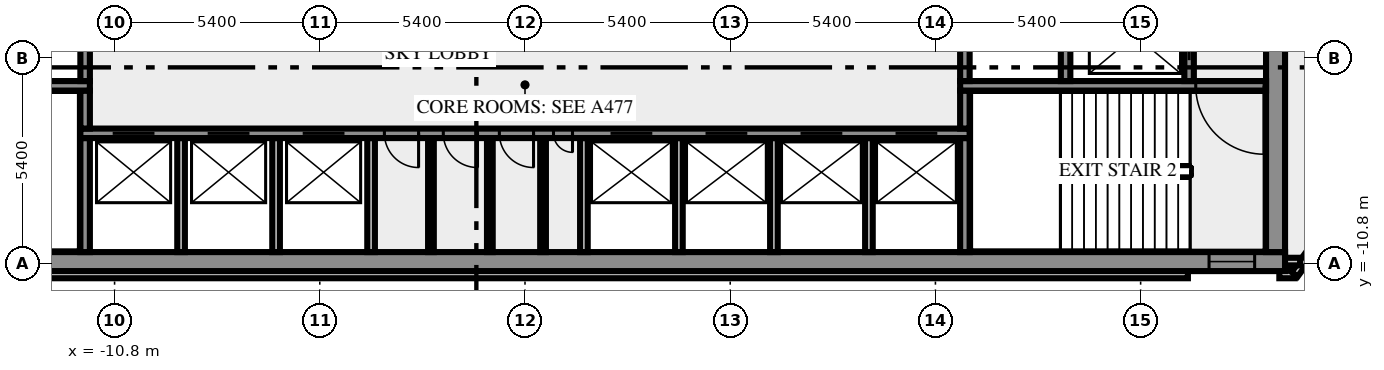
"""IFC4 building model, lengths in metres.
Left out: names, types, materials, properties, quantities, classifications, styles, units other than length and angle.
Written with IfcOpenShell. Run it as: python <this file> out.ifc"""

import sys

from ifc_helpers import new_model, si_unit, direction, frame, frame_2d, origin, place, context, subcontext, project, spatial, rectangle, extrude, element, fill, save


model = new_model("IFC4")
c1 = context("Model", 3, precision=1e-05, world=origin(), true_north=direction((0.0, 1.0)))
c2 = subcontext(c1, "Body", "Model", "MODEL_VIEW")
j1 = project(units=[si_unit("LENGTHUNIT", "METRE"), si_unit("PLANEANGLEUNIT", "RADIAN")], contexts=[c1])
p1 = place(None, origin())
s1 = spatial("IfcSite", under=j1, at=p1, CompositionType="ELEMENT")
p2 = place(p1, origin())
s2 = spatial("IfcBuilding", under=s1, at=p2, CompositionType="ELEMENT")
p3 = place(p2, frame((0.0, 0.0, 139.0)))
s3 = spatial("IfcBuildingStorey", under=s2, at=p3, CompositionType="ELEMENT", Elevation=139.0)
p4 = place(p3, frame((-17.444, -11.088, 0.0), z_axis=(0.0, 0.0, 1.0), x_axis=(1.0, 0.0, 0.0)))
e1 = element("IfcWall", 1, at=p4, inside=s3, PredefinedType="SOLIDWALL", context=c2, shape_type="SweptSolid", body=[
    extrude(rectangle(XDim=34.888, YDim=0.2, at=frame_2d((17.444, 0.0))), origin(), (0.0, 0.0, 1.0), 4.65),
])
p5 = place(p3, frame((19.85, -11.088, 0.0), z_axis=(0.0, 0.0, 1.0), x_axis=(1.0, 0.0, 0.0)))
e2 = element("IfcWall", 2, at=p5, inside=s3, PredefinedType="SOLIDWALL", context=c2, shape_type="SweptSolid", body=[
    extrude(rectangle(XDim=0.406, YDim=0.2, at=frame_2d((0.203, 0.0))), origin(), (0.0, 0.0, 1.0), 4.65),
])
p6 = place(p3, frame((20.253, -11.083, 0.0), z_axis=(0.0, 0.0, 1.0), x_axis=(0.587766567315, 0.809030569476, 0.0)))
e3 = element("IfcWall", 3, at=p6, inside=s3, PredefinedType="SOLIDWALL", context=c2, shape_type="SweptSolid", body=[
    extrude(rectangle(XDim=2.688, YDim=0.2, at=frame_2d((1.344, 0.0))), origin(), (0.0, 0.0, 1.0), 4.65),
])
p7 = place(p3, frame((19.98, -10.75, 0.0), z_axis=(0.0, 0.0, 1.0), x_axis=(1.0, 0.0, 0.0)))
e4 = element("IfcWall", 4, at=p7, inside=s3, PredefinedType="SOLIDWALL", context=c2, shape_type="SweptSolid", body=[
    extrude(rectangle(XDim=0.417, YDim=0.2, at=frame_2d((0.208, 0.0))), origin(), (0.0, 0.0, 1.0), 4.65),
])
p8 = place(p3, frame((-20.0, -10.75, 0.0), z_axis=(0.0, 0.0, 1.0), x_axis=(1.0, 0.0, 0.0)))
e5 = element("IfcWall", 5, at=p8, inside=s3, PredefinedType="SHEAR", context=c2, shape_type="SweptSolid", body=[
    extrude(rectangle(XDim=40.0, YDim=0.5, at=frame_2d((20.0, 0.0))), origin(), (0.0, 0.0, 1.0), 4.65),
])
p9 = place(p8, frame((0.8, 0.0, 1.0)))
e6 = element("IfcOpeningElement", 6, at=p9, cuts=e5, PredefinedType="OPENING", context=c2, shape_type="SweptSolid", body=[
    extrude(rectangle(XDim=1.2, YDim=1.2, at=frame_2d((0.6, 0.6))), frame((0.0, 0.26, 0.0), z_axis=(0.0, -1.0, 0.0), x_axis=(1.0, 0.0, 0.0)), (0.0, 0.0, 1.0), 0.52),
])
p10 = place(p8, frame((38.0, 0.0, 1.0)))
e7 = element("IfcOpeningElement", 7, at=p10, cuts=e5, PredefinedType="OPENING", context=c2, shape_type="SweptSolid", body=[
    extrude(rectangle(XDim=1.2, YDim=1.2, at=frame_2d((0.6, 0.6))), frame((0.0, 0.26, 0.0), z_axis=(0.0, -1.0, 0.0), x_axis=(1.0, 0.0, 0.0)), (0.0, 0.0, 1.0), 0.52),
])
p11 = place(p3, frame((-11.575, -10.5, 0.0), z_axis=(0.0, 0.0, 1.0), x_axis=(0.0, 1.0, 0.0)))
e8 = element("IfcWall", 8, at=p11, inside=s3, PredefinedType="SHEAR", context=c2, shape_type="SweptSolid", body=[
    extrude(rectangle(XDim=3.0, YDim=0.25, at=frame_2d((1.5, 0.0))), origin(), (0.0, 0.0, 1.0), 4.65),
])
for number, where, z_axis, x_axis in (
    (9, (-9.05, -10.5, 0.0), (0.0, 0.0, 1.0), (0.0, 1.0, 0.0)),
    (10, (-6.55, -10.5, 0.0), (0.0, 0.0, 1.0), (0.0, 1.0, 0.0)),
    (11, (-4.05, -10.5, 0.0), (0.0, 0.0, 1.0), (0.0, 1.0, 0.0)),
):
    element("IfcWall", number, at=place(p3, frame(where, z_axis=z_axis, x_axis=x_axis)), inside=s3, PredefinedType="SOLIDWALL", context=c2, shape_type="SweptSolid", body=[
        extrude(rectangle(XDim=3.0, YDim=0.2, at=frame_2d((1.5, 0.0))), origin(), (0.0, 0.0, 1.0), 4.65),
    ])
for number, where, z_axis, x_axis in (
    (12, (-2.475, -10.5, 0.0), (0.0, 0.0, 1.0), (0.0, 1.0, 0.0)),
    (13, (-0.925, -10.5, 0.0), (0.0, 0.0, 1.0), (0.0, 1.0, 0.0)),
    (14, (0.475, -10.5, 0.0), (0.0, 0.0, 1.0), (0.0, 1.0, 0.0)),
):
    element("IfcWall", number, at=place(p3, frame(where, z_axis=z_axis, x_axis=x_axis)), inside=s3, PredefinedType="PARTITIONING", context=c2, shape_type="SweptSolid", body=[
        extrude(rectangle(XDim=3.0, YDim=0.15, at=frame_2d((1.5, 0.0))), origin(), (0.0, 0.0, 1.0), 4.65),
    ])
for number, where, z_axis, x_axis in (
    (15, (1.55, -10.5, 0.0), (0.0, 0.0, 1.0), (0.0, 1.0, 0.0)),
    (16, (4.05, -10.5, 0.0), (0.0, 0.0, 1.0), (0.0, 1.0, 0.0)),
    (17, (6.55, -10.5, 0.0), (0.0, 0.0, 1.0), (0.0, 1.0, 0.0)),
    (18, (9.05, -10.5, 0.0), (0.0, 0.0, 1.0), (0.0, 1.0, 0.0)),
):
    element("IfcWall", number, at=place(p3, frame(where, z_axis=z_axis, x_axis=x_axis)), inside=s3, PredefinedType="SOLIDWALL", context=c2, shape_type="SweptSolid", body=[
        extrude(rectangle(XDim=3.0, YDim=0.2, at=frame_2d((1.5, 0.0))), origin(), (0.0, 0.0, 1.0), 4.65),
    ])
p12 = place(p3, frame((11.575, -10.5, 0.0), z_axis=(0.0, 0.0, 1.0), x_axis=(0.0, 1.0, 0.0)))
e19 = element("IfcWall", 19, at=p12, inside=s3, PredefinedType="SHEAR", context=c2, shape_type="SweptSolid", body=[
    extrude(rectangle(XDim=3.0, YDim=0.25, at=frame_2d((1.5, 0.0))), origin(), (0.0, 0.0, 1.0), 4.65),
])
p13 = place(p3, frame((19.75, -10.5, 0.0), z_axis=(0.0, 0.0, 1.0), x_axis=(0.0, 1.0, 0.0)))
e20 = element("IfcWall", 20, at=p13, inside=s3, PredefinedType="SHEAR", context=c2, shape_type="SweptSolid", body=[
    extrude(rectangle(XDim=8.8, YDim=0.5, at=frame_2d((4.4, 0.0))), origin(), (0.0, 0.0, 1.0), 4.65),
])
p14 = place(p3, frame((11.7, -7.375, 0.0), z_axis=(0.0, 0.0, 1.0), x_axis=(-1.0, 0.0, 0.0)))
e21 = element("IfcWall", 21, at=p14, inside=s3, PredefinedType="SHEAR", context=c2, shape_type="SweptSolid", body=[
    extrude(rectangle(XDim=23.4, YDim=0.25, at=frame_2d((11.7, 0.0))), origin(), (0.0, 0.0, 1.0), 4.65),
])
p15 = place(p14, frame((21.45, 0.0, 0.0)))
e22 = element("IfcOpeningElement", 22, at=p15, cuts=e21, PredefinedType="OPENING", context=c2, shape_type="SweptSolid", body=[
    extrude(rectangle(XDim=1.1, YDim=2.1, at=frame_2d((0.55, 1.05))), frame((0.0, 0.135, 0.0), z_axis=(0.0, -1.0, 0.0), x_axis=(1.0, 0.0, 0.0)), (0.0, 0.0, 1.0), 0.27),
])
p16 = place(p14, frame((18.95, 0.0, 0.0)))
e23 = element("IfcOpeningElement", 23, at=p16, cuts=e21, PredefinedType="OPENING", context=c2, shape_type="SweptSolid", body=[
    extrude(rectangle(XDim=1.1, YDim=2.1, at=frame_2d((0.55, 1.05))), frame((0.0, 0.135, 0.0), z_axis=(0.0, -1.0, 0.0), x_axis=(1.0, 0.0, 0.0)), (0.0, 0.0, 1.0), 0.27),
])
p17 = place(p14, frame((16.45, 0.0, 0.0)))
e24 = element("IfcOpeningElement", 24, at=p17, cuts=e21, PredefinedType="OPENING", context=c2, shape_type="SweptSolid", body=[
    extrude(rectangle(XDim=1.1, YDim=2.1, at=frame_2d((0.55, 1.05))), frame((0.0, 0.135, 0.0), z_axis=(0.0, -1.0, 0.0), x_axis=(1.0, 0.0, 0.0)), (0.0, 0.0, 1.0), 0.27),
])
p18 = place(p14, frame((14.5, 0.0, 0.0)))
e25 = element("IfcOpeningElement", 25, at=p18, cuts=e21, PredefinedType="OPENING", context=c2, shape_type="SweptSolid", body=[
    extrude(rectangle(XDim=0.9, YDim=2.1, at=frame_2d((0.45, 1.05))), frame((0.0, 0.135, 0.0), z_axis=(0.0, -1.0, 0.0), x_axis=(1.0, 0.0, 0.0)), (0.0, 0.0, 1.0), 0.27),
])
p19 = place(p14, frame((12.95, 0.0, 0.0)))
e26 = element("IfcOpeningElement", 26, at=p19, cuts=e21, PredefinedType="OPENING", context=c2, shape_type="SweptSolid", body=[
    extrude(rectangle(XDim=0.9, YDim=2.1, at=frame_2d((0.45, 1.05))), frame((0.0, 0.135, 0.0), z_axis=(0.0, -1.0, 0.0), x_axis=(1.0, 0.0, 0.0)), (0.0, 0.0, 1.0), 0.27),
])
p20 = place(p14, frame((11.475, 0.0, 0.0)))
e27 = element("IfcOpeningElement", 27, at=p20, cuts=e21, PredefinedType="OPENING", context=c2, shape_type="SweptSolid", body=[
    extrude(rectangle(XDim=0.9, YDim=2.1, at=frame_2d((0.45, 1.05))), frame((0.0, 0.135, 0.0), z_axis=(0.0, -1.0, 0.0), x_axis=(1.0, 0.0, 0.0)), (0.0, 0.0, 1.0), 0.27),
])
p21 = place(p14, frame((10.45, 0.0, 0.0)))
e28 = element("IfcOpeningElement", 28, at=p21, cuts=e21, PredefinedType="OPENING", context=c2, shape_type="SweptSolid", body=[
    extrude(rectangle(XDim=0.5, YDim=2.1, at=frame_2d((0.25, 1.05))), frame((0.0, 0.135, 0.0), z_axis=(0.0, -1.0, 0.0), x_axis=(1.0, 0.0, 0.0)), (0.0, 0.0, 1.0), 0.27),
])
p22 = place(p14, frame((8.35, 0.0, 0.0)))
e29 = element("IfcOpeningElement", 29, at=p22, cuts=e21, PredefinedType="OPENING", context=c2, shape_type="SweptSolid", body=[
    extrude(rectangle(XDim=1.1, YDim=2.1, at=frame_2d((0.55, 1.05))), frame((0.0, 0.135, 0.0), z_axis=(0.0, -1.0, 0.0), x_axis=(1.0, 0.0, 0.0)), (0.0, 0.0, 1.0), 0.27),
])
p23 = place(p14, frame((5.85, 0.0, 0.0)))
e30 = element("IfcOpeningElement", 30, at=p23, cuts=e21, PredefinedType="OPENING", context=c2, shape_type="SweptSolid", body=[
    extrude(rectangle(XDim=1.1, YDim=2.1, at=frame_2d((0.55, 1.05))), frame((0.0, 0.135, 0.0), z_axis=(0.0, -1.0, 0.0), x_axis=(1.0, 0.0, 0.0)), (0.0, 0.0, 1.0), 0.27),
])
p24 = place(p14, frame((3.35, 0.0, 0.0)))
e31 = element("IfcOpeningElement", 31, at=p24, cuts=e21, PredefinedType="OPENING", context=c2, shape_type="SweptSolid", body=[
    extrude(rectangle(XDim=1.1, YDim=2.1, at=frame_2d((0.55, 1.05))), frame((0.0, 0.135, 0.0), z_axis=(0.0, -1.0, 0.0), x_axis=(1.0, 0.0, 0.0)), (0.0, 0.0, 1.0), 0.27),
])
p25 = place(p14, frame((0.85, 0.0, 0.0)))
e32 = element("IfcOpeningElement", 32, at=p25, cuts=e21, PredefinedType="OPENING", context=c2, shape_type="SweptSolid", body=[
    extrude(rectangle(XDim=1.1, YDim=2.1, at=frame_2d((0.55, 1.05))), frame((0.0, 0.135, 0.0), z_axis=(0.0, -1.0, 0.0), x_axis=(1.0, 0.0, 0.0)), (0.0, 0.0, 1.0), 0.27),
])
for number, where, z_axis, x_axis in (
    (33, (-11.575, -7.25, 0.0), (0.0, 0.0, 1.0), (0.0, 1.0, 0.0)),
    (34, (11.575, -7.25, 0.0), (0.0, 0.0, 1.0), (0.0, 1.0, 0.0)),
):
    element("IfcWall", number, at=place(p3, frame(where, z_axis=z_axis, x_axis=x_axis)), inside=s3, PredefinedType="SHEAR", context=c2, shape_type="SweptSolid", body=[
        extrude(rectangle(XDim=1.0, YDim=0.25, at=frame_2d((0.5, 0.0))), origin(), (0.0, 0.0, 1.0), 4.65),
    ])
p26 = place(p3, frame((-11.45, -6.125, 0.0), z_axis=(0.0, 0.0, 1.0), x_axis=(-1.0, 0.0, 0.0)))
e35 = element("IfcWall", 35, at=p26, inside=s3, PredefinedType="SHEAR", context=c2, shape_type="SweptSolid", body=[
    extrude(rectangle(XDim=8.05, YDim=0.25, at=frame_2d((4.025, 0.0))), origin(), (0.0, 0.0, 1.0), 4.65),
])
p27 = place(p26, frame((6.2, 0.0, 0.0)))
e36 = element("IfcOpeningElement", 36, at=p27, cuts=e35, PredefinedType="OPENING", context=c2, shape_type="SweptSolid", body=[
    extrude(rectangle(XDim=1.8, YDim=2.1, at=frame_2d((0.9, 1.05))), frame((0.0, 0.135, 0.0), z_axis=(0.0, -1.0, 0.0), x_axis=(1.0, 0.0, 0.0)), (0.0, 0.0, 1.0), 0.27),
])
p28 = place(p3, frame((19.5, -6.125, 0.0), z_axis=(0.0, 0.0, 1.0), x_axis=(-1.0, 0.0, 0.0)))
e37 = element("IfcWall", 37, at=p28, inside=s3, PredefinedType="SHEAR", context=c2, shape_type="SweptSolid", body=[
    extrude(rectangle(XDim=8.05, YDim=0.25, at=frame_2d((4.025, 0.0))), origin(), (0.0, 0.0, 1.0), 4.65),
])
p29 = place(p28, frame((0.05, 0.0, 0.0)))
e38 = element("IfcOpeningElement", 38, at=p29, cuts=e37, PredefinedType="OPENING", context=c2, shape_type="SweptSolid", body=[
    extrude(rectangle(XDim=1.8, YDim=2.1, at=frame_2d((0.9, 1.05))), frame((0.0, 0.135, 0.0), z_axis=(0.0, -1.0, 0.0), x_axis=(1.0, 0.0, 0.0)), (0.0, 0.0, 1.0), 0.27),
])
for number, where, z_axis, x_axis in (
    (39, (-11.575, -6.0, 0.0), (0.0, 0.0, 1.0), (0.0, 1.0, 0.0)),
    (40, (11.575, -6.0, 0.0), (0.0, 0.0, 1.0), (0.0, 1.0, 0.0)),
    (41, (14.225, -6.0, 0.0), (0.0, 0.0, 1.0), (0.0, 1.0, 0.0)),
):
    element("IfcWall", number, at=place(p3, frame(where, z_axis=z_axis, x_axis=x_axis)), inside=s3, PredefinedType="SHEAR", context=c2, shape_type="SweptSolid", body=[
        extrude(rectangle(XDim=1.75, YDim=0.25, at=frame_2d((0.875, 0.0))), origin(), (0.0, 0.0, 1.0), 4.65),
    ])
p30 = place(p3, frame((17.475, -6.0, 0.0), z_axis=(0.0, 0.0, 1.0), x_axis=(0.0, 1.0, 0.0)))
e42 = element("IfcWall", 42, at=p30, inside=s3, PredefinedType="SHEAR", context=c2, shape_type="SweptSolid", body=[
    extrude(rectangle(XDim=4.3, YDim=0.25, at=frame_2d((2.15, 0.0))), origin(), (0.0, 0.0, 1.0), 4.65),
])
p31 = place(p30, frame((0.55, 0.0, 0.0)))
e43 = element("IfcOpeningElement", 43, at=p31, cuts=e42, PredefinedType="OPENING", context=c2, shape_type="SweptSolid", body=[
    extrude(rectangle(XDim=1.3, YDim=2.1, at=frame_2d((0.65, 1.05))), frame((0.0, 0.135, 0.0), z_axis=(0.0, -1.0, 0.0), x_axis=(1.0, 0.0, 0.0)), (0.0, 0.0, 1.0), 0.27),
])
p32 = place(p10, origin())
e44 = element("IfcWindow", 44, at=p32, inside=s3, PartitioningType="SINGLE_PANEL", PredefinedType="WINDOW", context=c2, shape_type="SweptSolid", body=[
    extrude(rectangle(XDim=1.2, YDim=1.2, at=frame_2d((0.6, 0.6))), frame((0.0, 0.03, 0.0), z_axis=(0.0, -1.0, 0.0), x_axis=(1.0, 0.0, 0.0)), (0.0, 0.0, 1.0), 0.06),
])
fill(e7, e44)
p33 = place(p15, origin())
e45 = element("IfcDoor", 45, at=p33, inside=s3, OperationType="DOUBLE_DOOR_SLIDING", PredefinedType="DOOR", context=c2, shape_type="SweptSolid", body=[
    extrude(rectangle(XDim=1.1, YDim=2.1, at=frame_2d((0.55, 1.05))), frame((0.0, 0.025, 0.0), z_axis=(0.0, -1.0, 0.0), x_axis=(1.0, 0.0, 0.0)), (0.0, 0.0, 1.0), 0.05),
])
fill(e22, e45)
p34 = place(p16, origin())
e46 = element("IfcDoor", 46, at=p34, inside=s3, OperationType="DOUBLE_DOOR_SLIDING", PredefinedType="DOOR", context=c2, shape_type="SweptSolid", body=[
    extrude(rectangle(XDim=1.1, YDim=2.1, at=frame_2d((0.55, 1.05))), frame((0.0, 0.025, 0.0), z_axis=(0.0, -1.0, 0.0), x_axis=(1.0, 0.0, 0.0)), (0.0, 0.0, 1.0), 0.05),
])
fill(e23, e46)
p35 = place(p17, origin())
e47 = element("IfcDoor", 47, at=p35, inside=s3, OperationType="DOUBLE_DOOR_SLIDING", PredefinedType="DOOR", context=c2, shape_type="SweptSolid", body=[
    extrude(rectangle(XDim=1.1, YDim=2.1, at=frame_2d((0.55, 1.05))), frame((0.0, 0.025, 0.0), z_axis=(0.0, -1.0, 0.0), x_axis=(1.0, 0.0, 0.0)), (0.0, 0.0, 1.0), 0.05),
])
fill(e24, e47)
p36 = place(p18, origin())
e48 = element("IfcDoor", 48, at=p36, inside=s3, OperationType="SINGLE_SWING_RIGHT", PredefinedType="DOOR", context=c2, shape_type="SweptSolid", body=[
    extrude(rectangle(XDim=0.9, YDim=2.1, at=frame_2d((0.45, 1.05))), frame((0.0, 0.025, 0.0), z_axis=(0.0, -1.0, 0.0), x_axis=(1.0, 0.0, 0.0)), (0.0, 0.0, 1.0), 0.05),
])
fill(e25, e48)
p37 = place(p19, origin())
e49 = element("IfcDoor", 49, at=p37, inside=s3, OperationType="SINGLE_SWING_RIGHT", PredefinedType="DOOR", context=c2, shape_type="SweptSolid", body=[
    extrude(rectangle(XDim=0.9, YDim=2.1, at=frame_2d((0.45, 1.05))), frame((0.0, 0.025, 0.0), z_axis=(0.0, -1.0, 0.0), x_axis=(1.0, 0.0, 0.0)), (0.0, 0.0, 1.0), 0.05),
])
fill(e26, e49)
p38 = place(p20, origin())
e50 = element("IfcDoor", 50, at=p38, inside=s3, OperationType="SINGLE_SWING_RIGHT", PredefinedType="DOOR", context=c2, shape_type="SweptSolid", body=[
    extrude(rectangle(XDim=0.9, YDim=2.1, at=frame_2d((0.45, 1.05))), frame((0.0, 0.025, 0.0), z_axis=(0.0, -1.0, 0.0), x_axis=(1.0, 0.0, 0.0)), (0.0, 0.0, 1.0), 0.05),
])
fill(e27, e50)
p39 = place(p21, origin())
e51 = element("IfcDoor", 51, at=p39, inside=s3, OperationType="SINGLE_SWING_LEFT", PredefinedType="DOOR", context=c2, shape_type="SweptSolid", body=[
    extrude(rectangle(XDim=0.5, YDim=2.1, at=frame_2d((0.25, 1.05))), frame((0.0, 0.025, 0.0), z_axis=(0.0, -1.0, 0.0), x_axis=(1.0, 0.0, 0.0)), (0.0, 0.0, 1.0), 0.05),
])
fill(e28, e51)
p40 = place(p22, origin())
e52 = element("IfcDoor", 52, at=p40, inside=s3, OperationType="DOUBLE_DOOR_SLIDING", PredefinedType="DOOR", context=c2, shape_type="SweptSolid", body=[
    extrude(rectangle(XDim=1.1, YDim=2.1, at=frame_2d((0.55, 1.05))), frame((0.0, 0.025, 0.0), z_axis=(0.0, -1.0, 0.0), x_axis=(1.0, 0.0, 0.0)), (0.0, 0.0, 1.0), 0.05),
])
fill(e29, e52)
p41 = place(p23, origin())
e53 = element("IfcDoor", 53, at=p41, inside=s3, OperationType="DOUBLE_DOOR_SLIDING", PredefinedType="DOOR", context=c2, shape_type="SweptSolid", body=[
    extrude(rectangle(XDim=1.1, YDim=2.1, at=frame_2d((0.55, 1.05))), frame((0.0, 0.025, 0.0), z_axis=(0.0, -1.0, 0.0), x_axis=(1.0, 0.0, 0.0)), (0.0, 0.0, 1.0), 0.05),
])
fill(e30, e53)
p42 = place(p24, origin())
e54 = element("IfcDoor", 54, at=p42, inside=s3, OperationType="DOUBLE_DOOR_SLIDING", PredefinedType="DOOR", context=c2, shape_type="SweptSolid", body=[
    extrude(rectangle(XDim=1.1, YDim=2.1, at=frame_2d((0.55, 1.05))), frame((0.0, 0.025, 0.0), z_axis=(0.0, -1.0, 0.0), x_axis=(1.0, 0.0, 0.0)), (0.0, 0.0, 1.0), 0.05),
])
fill(e31, e54)
p43 = place(p25, origin())
e55 = element("IfcDoor", 55, at=p43, inside=s3, OperationType="DOUBLE_DOOR_SLIDING", PredefinedType="DOOR", context=c2, shape_type="SweptSolid", body=[
    extrude(rectangle(XDim=1.1, YDim=2.1, at=frame_2d((0.55, 1.05))), frame((0.0, 0.025, 0.0), z_axis=(0.0, -1.0, 0.0), x_axis=(1.0, 0.0, 0.0)), (0.0, 0.0, 1.0), 0.05),
])
fill(e32, e55)
p44 = place(p29, origin())
e56 = element("IfcDoor", 56, at=p44, inside=s3, OperationType="DOUBLE_DOOR_SINGLE_SWING", PredefinedType="DOOR", context=c2, shape_type="SweptSolid", body=[
    extrude(rectangle(XDim=1.8, YDim=2.1, at=frame_2d((0.9, 1.05))), frame((0.0, 0.025, 0.0), z_axis=(0.0, -1.0, 0.0), x_axis=(1.0, 0.0, 0.0)), (0.0, 0.0, 1.0), 0.05),
])
fill(e38, e56)
p45 = place(p31, origin())
e57 = element("IfcDoor", 57, at=p45, inside=s3, OperationType="DOUBLE_DOOR_SLIDING", PredefinedType="DOOR", context=c2, shape_type="SweptSolid", body=[
    extrude(rectangle(XDim=1.3, YDim=2.1, at=frame_2d((0.65, 1.05))), frame((0.0, 0.025, 0.0), z_axis=(0.0, -1.0, 0.0), x_axis=(1.0, 0.0, 0.0)), (0.0, 0.0, 1.0), 0.05),
])
fill(e43, e57)
save(model, sys.argv[1])
